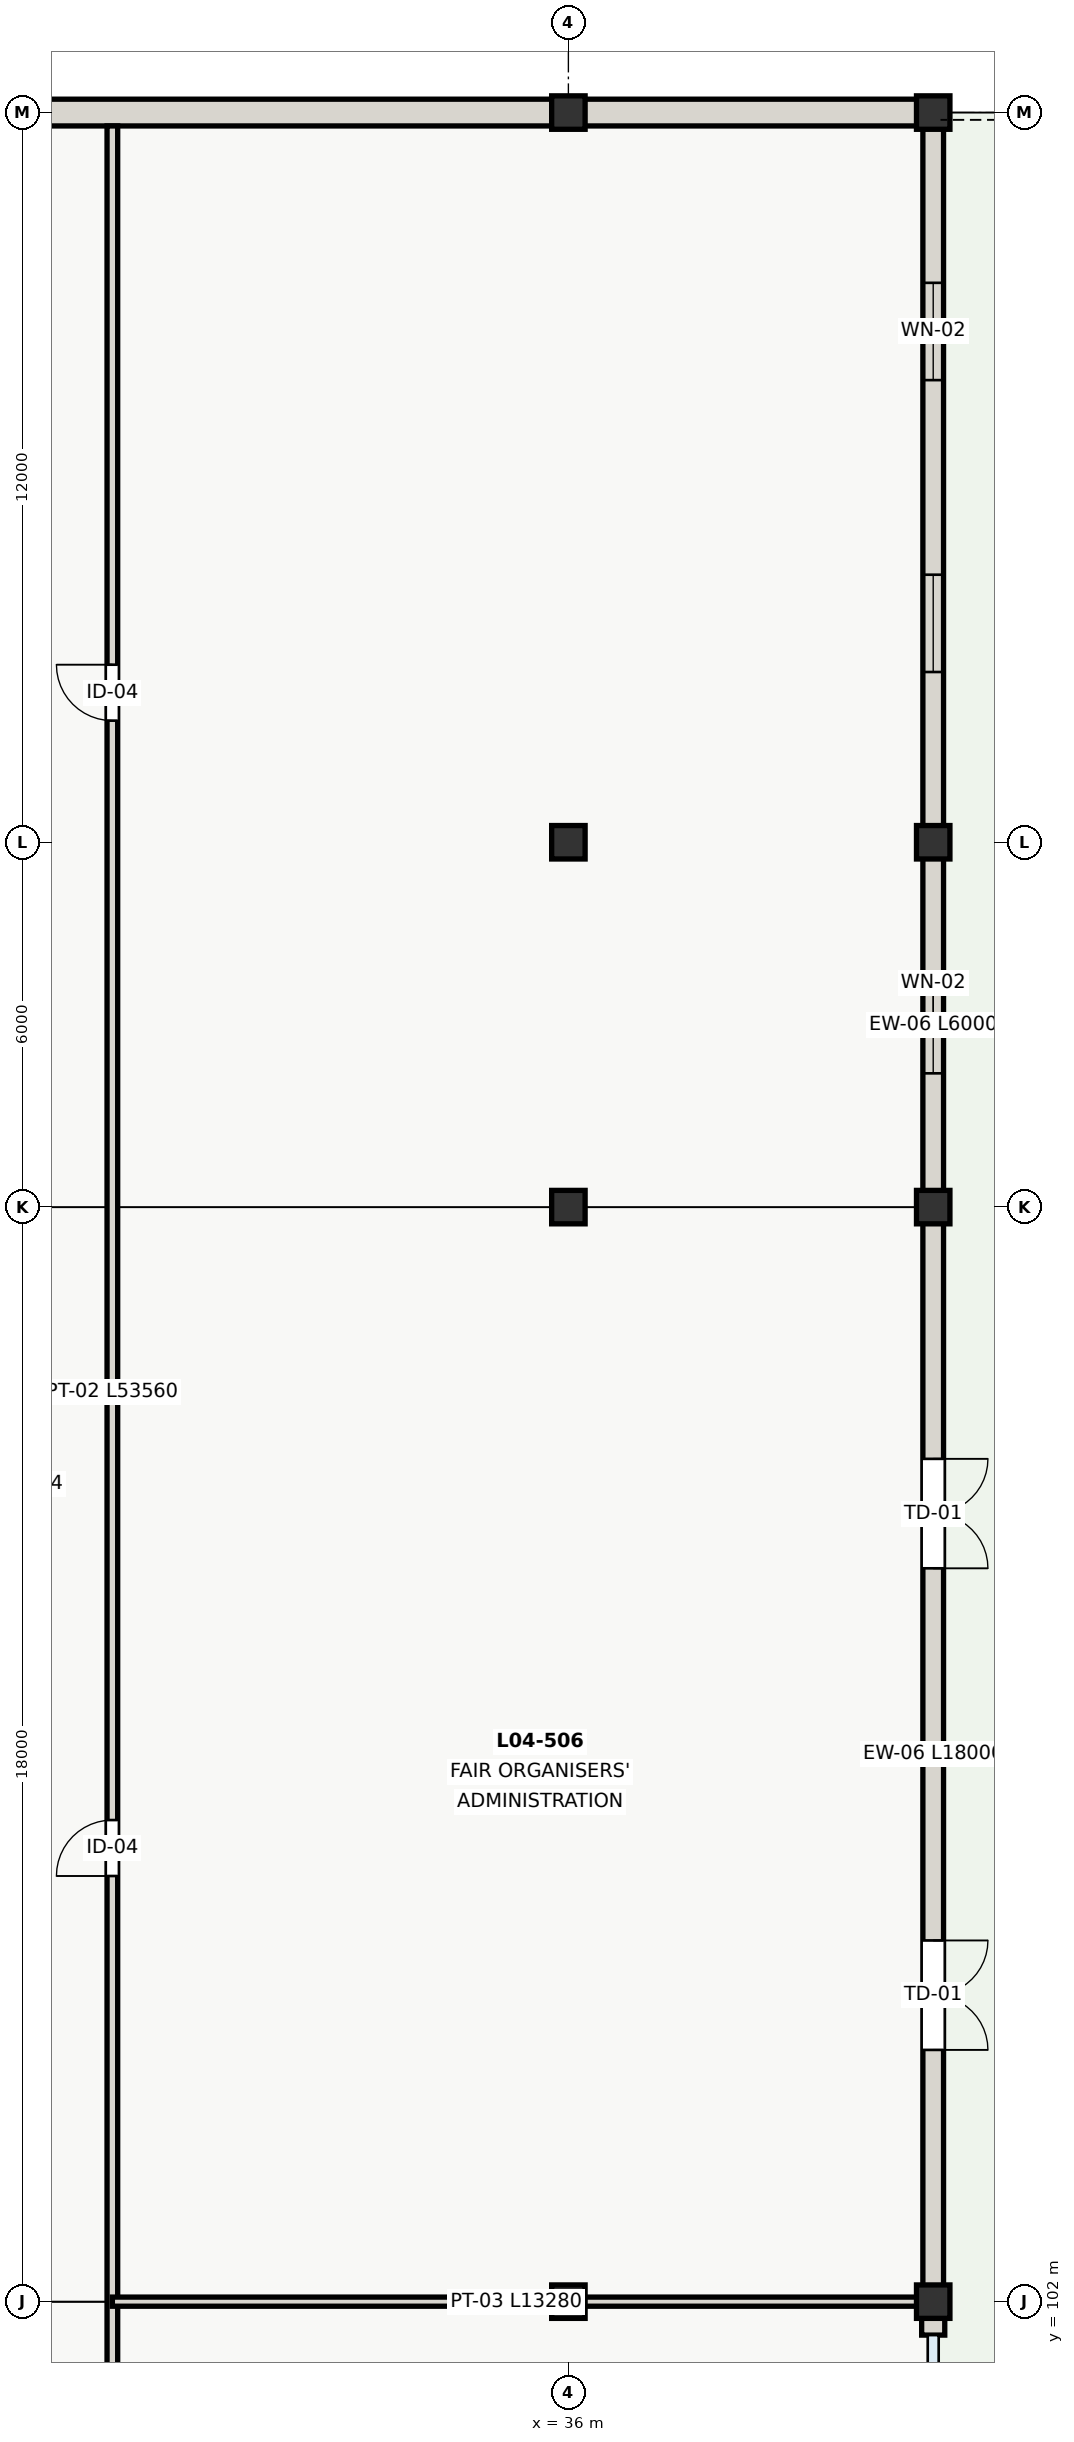
"""IFC4 building model, lengths in metres.
Left out: names, types, materials, properties, quantities, classifications, styles, units other than length and angle.
Written with IfcOpenShell. Run it as: python <this file> out.ifc"""

import sys

from ifc_helpers import new_model, si_unit, direction, frame, frame_2d, origin, origin_2d, place, context, subcontext, project, spatial, rectangle, extrude, element, fill, save


model = new_model("IFC4")
c1 = context("Model", 3, precision=1e-05, world=origin(), true_north=direction((0.0, 1.0)))
c2 = subcontext(c1, "Body", "Model", "MODEL_VIEW")
j1 = project(units=[si_unit("LENGTHUNIT", "METRE"), si_unit("PLANEANGLEUNIT", "RADIAN")], contexts=[c1])
p1 = place(None, origin())
s1 = spatial("IfcSite", under=j1, at=p1, CompositionType="ELEMENT")
p2 = place(p1, origin())
s2 = spatial("IfcBuilding", under=s1, at=p2, CompositionType="ELEMENT")
p3 = place(p2, frame((0.0, 0.0, 12.6)))
s3 = spatial("IfcBuildingStorey", under=s2, at=p3, CompositionType="ELEMENT", Elevation=12.6)
for number, where, z_axis, x_axis in (
    (1, (36.0, 102.0, 0.0), (0.0, 0.0, 1.0), (1.0, 0.0, 0.0)),
    (2, (42.0, 102.0, 0.0), (0.0, 0.0, 1.0), (1.0, 0.0, 0.0)),
    (3, (36.0, 120.0, 0.0), (0.0, 0.0, 1.0), (1.0, 0.0, 0.0)),
    (4, (42.0, 120.0, 0.0), (0.0, 0.0, 1.0), (1.0, 0.0, 0.0)),
    (5, (36.0, 126.0, 0.0), (0.0, 0.0, 1.0), (1.0, 0.0, 0.0)),
    (6, (42.0, 126.0, 0.0), (0.0, 0.0, 1.0), (1.0, 0.0, 0.0)),
    (7, (36.0, 138.0, 0.0), (0.0, 0.0, 1.0), (1.0, 0.0, 0.0)),
    (8, (42.0, 138.0, 0.0), (0.0, 0.0, 1.0), (1.0, 0.0, 0.0)),
):
    element("IfcColumn", number, at=place(p3, frame(where, z_axis=z_axis, x_axis=x_axis)), inside=s3, PredefinedType="COLUMN", context=c2, shape_type="SweptSolid", body=[
        extrude(rectangle(XDim=0.55, YDim=0.55, at=origin_2d()), origin(), (0.0, 0.0, 1.0), 4.2),
    ])
p4 = place(p3, frame((42.0, 101.998, 0.0), z_axis=(0.0, 0.0, 1.0), x_axis=(0.0, -1.0, 0.0)))
e9 = element("IfcWall", 9, at=p4, inside=s3, PredefinedType="SOLIDWALL", context=c2, shape_type="SweptSolid", body=[
    extrude(rectangle(XDim=0.548, YDim=0.38, at=frame_2d((0.274, 0.0))), origin(), (0.0, 0.0, 1.0), 3.3),
])
p5 = place(p3, frame((42.0, 120.0, 0.0), z_axis=(0.0, 0.0, 1.0), x_axis=(0.0, -1.0, 0.0)))
e10 = element("IfcWall", 10, at=p5, inside=s3, PredefinedType="SOLIDWALL", context=c2, shape_type="SweptSolid", body=[
    extrude(rectangle(XDim=18.0, YDim=0.34, at=frame_2d((9.0, 0.0))), origin(), (0.0, 0.0, 1.0), 3.3),
])
p6 = place(p5, frame((4.14, 0.0, 0.0)))
e11 = element("IfcOpeningElement", 11, at=p6, cuts=e10, PredefinedType="OPENING", context=c2, shape_type="SweptSolid", body=[
    extrude(rectangle(XDim=1.8, YDim=2.2, at=frame_2d((0.9, 1.1))), frame((0.0, 0.18, 0.0), z_axis=(0.0, -1.0, 0.0), x_axis=(1.0, 0.0, 0.0)), (0.0, 0.0, 1.0), 0.36),
])
p7 = place(p5, frame((12.06, 0.0, 0.0)))
e12 = element("IfcOpeningElement", 12, at=p7, cuts=e10, PredefinedType="OPENING", context=c2, shape_type="SweptSolid", body=[
    extrude(rectangle(XDim=1.8, YDim=2.2, at=frame_2d((0.9, 1.1))), frame((0.0, 0.18, 0.0), z_axis=(0.0, -1.0, 0.0), x_axis=(1.0, 0.0, 0.0)), (0.0, 0.0, 1.0), 0.36),
])
p8 = place(p3, frame((42.0, 126.0, 0.0), z_axis=(0.0, 0.0, 1.0), x_axis=(0.0, -1.0, 0.0)))
e13 = element("IfcWall", 13, at=p8, inside=s3, PredefinedType="SOLIDWALL", context=c2, shape_type="SweptSolid", body=[
    extrude(rectangle(XDim=6.0, YDim=0.34, at=frame_2d((3.0, 0.0))), origin(), (0.0, 0.0, 1.0), 3.54),
])
p9 = place(p8, frame((2.2, 0.0, 0.9)))
e14 = element("IfcOpeningElement", 14, at=p9, cuts=e13, PredefinedType="OPENING", context=c2, shape_type="SweptSolid", body=[
    extrude(rectangle(XDim=1.6, YDim=2.0, at=frame_2d((0.8, 1.0))), frame((0.0, 0.18, 0.0), z_axis=(0.0, -1.0, 0.0), x_axis=(1.0, 0.0, 0.0)), (0.0, 0.0, 1.0), 0.36),
])
p10 = place(p3, frame((42.0, 138.0, 0.0), z_axis=(0.0, 0.0, 1.0), x_axis=(0.0, -1.0, 0.0)))
e15 = element("IfcWall", 15, at=p10, inside=s3, PredefinedType="SOLIDWALL", context=c2, shape_type="SweptSolid", body=[
    extrude(rectangle(XDim=12.0, YDim=0.34, at=frame_2d((6.0, 0.0))), origin(), (0.0, 0.0, 1.0), 4.2),
])
p11 = place(p10, frame((2.8, 0.0, 0.9)))
e16 = element("IfcOpeningElement", 16, at=p11, cuts=e15, PredefinedType="OPENING", context=c2, shape_type="SweptSolid", body=[
    extrude(rectangle(XDim=1.6, YDim=2.0, at=frame_2d((0.8, 1.0))), frame((0.0, 0.18, 0.0), z_axis=(0.0, -1.0, 0.0), x_axis=(1.0, 0.0, 0.0)), (0.0, 0.0, 1.0), 0.36),
])
p12 = place(p10, frame((7.6, 0.0, 0.9)))
e17 = element("IfcOpeningElement", 17, at=p12, cuts=e15, PredefinedType="OPENING", context=c2, shape_type="SweptSolid", body=[
    extrude(rectangle(XDim=1.6, YDim=2.0, at=frame_2d((0.8, 1.0))), frame((0.0, 0.18, 0.0), z_axis=(0.0, -1.0, 0.0), x_axis=(1.0, 0.0, 0.0)), (0.0, 0.0, 1.0), 0.36),
])
p13 = place(p3, frame((24.0, 138.0, 0.0), z_axis=(0.0, 0.0, 1.0), x_axis=(1.0, 0.0, 0.0)))
e18 = element("IfcWall", 18, at=p13, inside=s3, PredefinedType="SHEAR", context=c2, shape_type="SweptSolid", body=[
    extrude(rectangle(XDim=12.0, YDim=0.44, at=frame_2d((6.0, 0.0))), origin(), (0.0, 0.0, 1.0), 4.2),
])
p14 = place(p3, frame((36.0, 138.0, 0.0), z_axis=(0.0, 0.0, 1.0), x_axis=(1.0, 0.0, 0.0)))
e19 = element("IfcWall", 19, at=p14, inside=s3, PredefinedType="SHEAR", context=c2, shape_type="SweptSolid", body=[
    extrude(rectangle(XDim=6.0, YDim=0.44, at=frame_2d((3.0, 0.0))), origin(), (0.0, 0.0, 1.0), 4.2),
])
p15 = place(p3, frame((28.5, 84.22, 0.0), z_axis=(0.0, 0.0, 1.0), x_axis=(0.0, 1.0, 0.0)))
e20 = element("IfcWall", 20, at=p15, inside=s3, PredefinedType="PARTITIONING", context=c2, shape_type="SweptSolid", body=[
    extrude(rectangle(XDim=53.56, YDim=0.175, at=frame_2d((26.78, 0.0))), origin(), (0.0, 0.0, 1.0), 3.78),
])
p16 = place(p15, frame((7.78, 0.0, 0.0)))
e21 = element("IfcOpeningElement", 21, at=p16, cuts=e20, PredefinedType="OPENING", context=c2, shape_type="SweptSolid", body=[
    extrude(rectangle(XDim=0.98, YDim=2.1, at=frame_2d((0.49, 1.05))), frame((0.0, 0.097, 0.0), z_axis=(0.0, -1.0, 0.0), x_axis=(1.0, 0.0, 0.0)), (0.0, 0.0, 1.0), 0.195),
])
p17 = place(p15, frame((24.78, 0.0, 0.0)))
e22 = element("IfcOpeningElement", 22, at=p17, cuts=e20, PredefinedType="OPENING", context=c2, shape_type="SweptSolid", body=[
    extrude(rectangle(XDim=0.92, YDim=2.05, at=frame_2d((0.46, 1.025))), frame((0.0, 0.097, 0.0), z_axis=(0.0, -1.0, 0.0), x_axis=(1.0, 0.0, 0.0)), (0.0, 0.0, 1.0), 0.195),
])
p18 = place(p15, frame((43.78, 0.0, 0.0)))
e23 = element("IfcOpeningElement", 23, at=p18, cuts=e20, PredefinedType="OPENING", context=c2, shape_type="SweptSolid", body=[
    extrude(rectangle(XDim=0.92, YDim=2.05, at=frame_2d((0.46, 1.025))), frame((0.0, 0.097, 0.0), z_axis=(0.0, -1.0, 0.0), x_axis=(1.0, 0.0, 0.0)), (0.0, 0.0, 1.0), 0.195),
])
p19 = place(p3, frame((28.5, 102.0, 0.0), z_axis=(0.0, 0.0, 1.0), x_axis=(1.0, 0.0, 0.0)))
e24 = element("IfcWall", 24, at=p19, inside=s3, PredefinedType="PARTITIONING", context=c2, shape_type="SweptSolid", body=[
    extrude(rectangle(XDim=13.28, YDim=0.15, at=frame_2d((6.64, 0.0))), origin(), (0.0, 0.0, 1.0), 3.44),
])
p20 = place(p6, origin())
e25 = element("IfcDoor", 25, at=p20, inside=s3, OperationType="DOUBLE_DOOR_SINGLE_SWING", PredefinedType="DOOR", context=c2, shape_type="SweptSolid", body=[
    extrude(rectangle(XDim=1.8, YDim=2.2, at=frame_2d((0.9, 1.1))), frame((0.0, 0.025, 0.0), z_axis=(0.0, -1.0, 0.0), x_axis=(1.0, 0.0, 0.0)), (0.0, 0.0, 1.0), 0.05),
])
fill(e11, e25)
p21 = place(p7, origin())
e26 = element("IfcDoor", 26, at=p21, inside=s3, OperationType="DOUBLE_DOOR_SINGLE_SWING", PredefinedType="DOOR", context=c2, shape_type="SweptSolid", body=[
    extrude(rectangle(XDim=1.8, YDim=2.2, at=frame_2d((0.9, 1.1))), frame((0.0, 0.025, 0.0), z_axis=(0.0, -1.0, 0.0), x_axis=(1.0, 0.0, 0.0)), (0.0, 0.0, 1.0), 0.05),
])
fill(e12, e26)
p22 = place(p9, origin())
e27 = element("IfcWindow", 27, at=p22, inside=s3, PartitioningType="SINGLE_PANEL", PredefinedType="WINDOW", context=c2, shape_type="SweptSolid", body=[
    extrude(rectangle(XDim=1.6, YDim=2.0, at=frame_2d((0.8, 1.0))), frame((0.0, 0.03, 0.0), z_axis=(0.0, -1.0, 0.0), x_axis=(1.0, 0.0, 0.0)), (0.0, 0.0, 1.0), 0.06),
])
fill(e14, e27)
p23 = place(p11, origin())
e28 = element("IfcWindow", 28, at=p23, inside=s3, PartitioningType="SINGLE_PANEL", PredefinedType="WINDOW", context=c2, shape_type="SweptSolid", body=[
    extrude(rectangle(XDim=1.6, YDim=2.0, at=frame_2d((0.8, 1.0))), frame((0.0, 0.03, 0.0), z_axis=(0.0, -1.0, 0.0), x_axis=(1.0, 0.0, 0.0)), (0.0, 0.0, 1.0), 0.06),
])
fill(e16, e28)
p24 = place(p12, origin())
e29 = element("IfcWindow", 29, at=p24, inside=s3, PartitioningType="SINGLE_PANEL", PredefinedType="WINDOW", context=c2, shape_type="SweptSolid", body=[
    extrude(rectangle(XDim=1.6, YDim=2.0, at=frame_2d((0.8, 1.0))), frame((0.0, 0.03, 0.0), z_axis=(0.0, -1.0, 0.0), x_axis=(1.0, 0.0, 0.0)), (0.0, 0.0, 1.0), 0.06),
])
fill(e17, e29)
p25 = place(p17, origin())
e30 = element("IfcDoor", 30, at=p25, inside=s3, OperationType="SINGLE_SWING_LEFT", PredefinedType="DOOR", context=c2, shape_type="SweptSolid", body=[
    extrude(rectangle(XDim=0.92, YDim=2.05, at=frame_2d((0.46, 1.025))), frame((0.0, 0.025, 0.0), z_axis=(0.0, -1.0, 0.0), x_axis=(1.0, 0.0, 0.0)), (0.0, 0.0, 1.0), 0.05),
])
fill(e22, e30)
p26 = place(p18, origin())
e31 = element("IfcDoor", 31, at=p26, inside=s3, OperationType="SINGLE_SWING_RIGHT", PredefinedType="DOOR", context=c2, shape_type="SweptSolid", body=[
    extrude(rectangle(XDim=0.92, YDim=2.05, at=frame_2d((0.46, 1.025))), frame((0.0, 0.025, 0.0), z_axis=(0.0, -1.0, 0.0), x_axis=(1.0, 0.0, 0.0)), (0.0, 0.0, 1.0), 0.05),
])
fill(e23, e31)
save(model, sys.argv[1])
